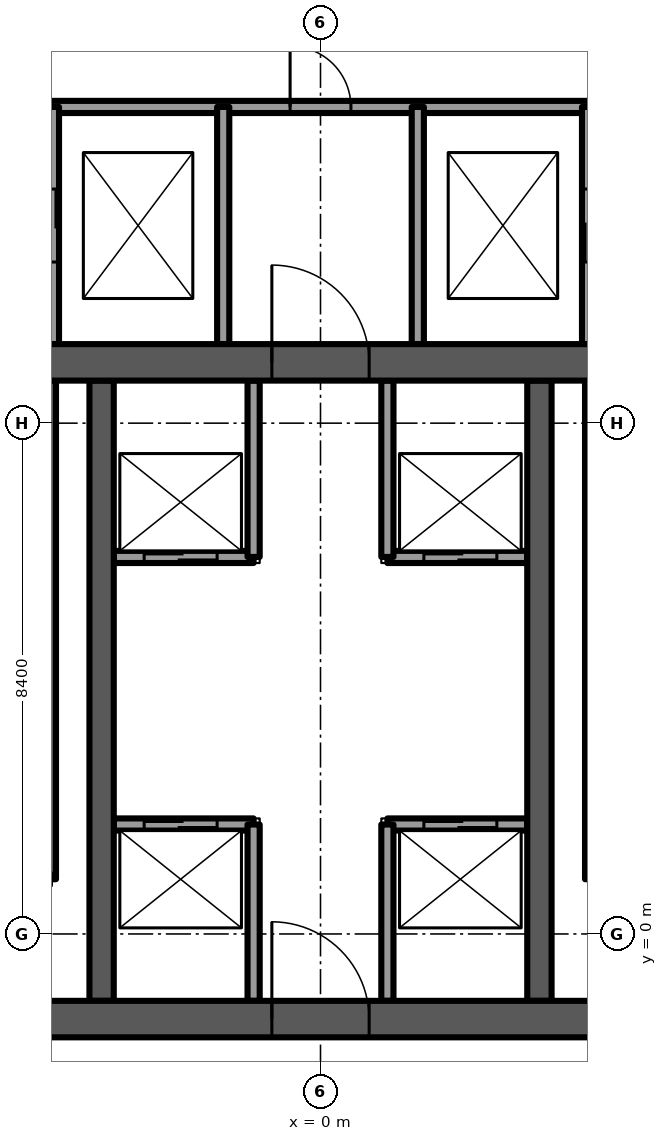
"""IFC4 building model, lengths in metres.
Left out: names, types, materials, properties, quantities, classifications, styles, units other than length and angle.
Written with IfcOpenShell. Run it as: python <this file> out.ifc"""

import sys

from ifc_helpers import new_model, si_unit, direction, frame, frame_2d, origin, place, context, subcontext, project, spatial, rectangle, extrude, element, fill, save


model = new_model("IFC4")
c1 = context("Model", 3, precision=1e-05, world=origin(), true_north=direction((0.0, 1.0)))
c2 = subcontext(c1, "Body", "Model", "MODEL_VIEW")
j1 = project(units=[si_unit("LENGTHUNIT", "METRE"), si_unit("PLANEANGLEUNIT", "RADIAN")], contexts=[c1])
p1 = place(None, origin())
s1 = spatial("IfcSite", under=j1, at=p1, CompositionType="ELEMENT")
p2 = place(p1, origin())
s2 = spatial("IfcBuilding", under=s1, at=p2, CompositionType="ELEMENT")
p3 = place(p2, frame((0.0, 0.0, 229.5)))
s3 = spatial("IfcBuildingStorey", under=s2, at=p3, CompositionType="ELEMENT", Elevation=229.5)
p4 = place(p3, frame((-8.5, -1.4, -0.3), z_axis=(0.0, 0.0, 1.0), x_axis=(1.0, 0.0, 0.0)))
e1 = element("IfcWall", 1, at=p4, inside=s3, PredefinedType="SHEAR", context=c2, shape_type="SweptSolid", body=[
    extrude(rectangle(XDim=17.0, YDim=0.6, at=frame_2d((8.5, 0.0))), origin(), (0.0, 0.0, 1.0), 3.75),
])
p5 = place(p4, frame((7.7, 0.0, 0.0)))
e2 = element("IfcOpeningElement", 2, at=p5, cuts=e1, PredefinedType="OPENING", context=c2, shape_type="SweptSolid", body=[
    extrude(rectangle(XDim=1.6, YDim=2.1, at=frame_2d((0.8, 1.05))), frame((0.0, 0.3, 0.0), z_axis=(0.0, -1.0, 0.0), x_axis=(1.0, 0.0, 0.0)), (0.0, 0.0, 1.0), 0.6),
])
p6 = place(p3, frame((-8.5, 9.4, -0.3), z_axis=(0.0, 0.0, 1.0), x_axis=(1.0, 0.0, 0.0)))
e3 = element("IfcWall", 3, at=p6, inside=s3, PredefinedType="SHEAR", context=c2, shape_type="SweptSolid", body=[
    extrude(rectangle(XDim=17.0, YDim=0.6, at=frame_2d((8.5, 0.0))), origin(), (0.0, 0.0, 1.0), 3.75),
])
p7 = place(p6, frame((7.7, 0.0, 0.0)))
e4 = element("IfcOpeningElement", 4, at=p7, cuts=e3, PredefinedType="OPENING", context=c2, shape_type="SweptSolid", body=[
    extrude(rectangle(XDim=1.6, YDim=2.1, at=frame_2d((0.8, 1.05))), frame((0.0, 0.3, 0.0), z_axis=(0.0, -1.0, 0.0), x_axis=(1.0, 0.0, 0.0)), (0.0, 0.0, 1.0), 0.6),
])
p8 = place(p6, frame((1.75, 0.0, 0.0)))
e5 = element("IfcOpeningElement", 5, at=p8, cuts=e3, PredefinedType="OPENING", context=c2, shape_type="SweptSolid", body=[
    extrude(rectangle(XDim=1.1, YDim=2.1, at=frame_2d((0.55, 1.05))), frame((0.0, 0.3, 0.0), z_axis=(0.0, -1.0, 0.0), x_axis=(1.0, 0.0, 0.0)), (0.0, 0.0, 1.0), 0.6),
])
p9 = place(p6, frame((14.15, 0.0, 0.0)))
e6 = element("IfcOpeningElement", 6, at=p9, cuts=e3, PredefinedType="OPENING", context=c2, shape_type="SweptSolid", body=[
    extrude(rectangle(XDim=1.1, YDim=2.1, at=frame_2d((0.55, 1.05))), frame((0.0, 0.3, 0.0), z_axis=(0.0, -1.0, 0.0), x_axis=(1.0, 0.0, 0.0)), (0.0, 0.0, 1.0), 0.6),
])
for number, where, z_axis, x_axis in (
    (7, (-3.6, -1.1, -0.3), (0.0, 0.0, 1.0), (0.0, 1.0, 0.0)),
    (8, (3.6, -1.1, -0.3), (0.0, 0.0, 1.0), (0.0, 1.0, 0.0)),
):
    element("IfcWall", number, at=place(p3, frame(where, z_axis=z_axis, x_axis=x_axis)), inside=s3, PredefinedType="SHEAR", context=c2, shape_type="SweptSolid", body=[
        extrude(rectangle(XDim=10.2, YDim=0.4, at=frame_2d((5.1, 0.0))), origin(), (0.0, 0.0, 1.0), 3.75),
    ])
p10 = place(p3, frame((-3.4, 1.8, 0.0), z_axis=(0.0, 0.0, 1.0), x_axis=(1.0, 0.0, 0.0)))
e9 = element("IfcWall", 9, at=p10, inside=s3, PredefinedType="PARTITIONING", context=c2, shape_type="SweptSolid", body=[
    extrude(rectangle(XDim=2.3, YDim=0.2, at=frame_2d((1.15, 0.0))), origin(), (0.0, 0.0, 1.0), 3.45),
])
p11 = place(p10, frame((0.5, 0.0, 0.0)))
e10 = element("IfcOpeningElement", 10, at=p11, cuts=e9, PredefinedType="OPENING", context=c2, shape_type="SweptSolid", body=[
    extrude(rectangle(XDim=1.2, YDim=2.1, at=frame_2d((0.6, 1.05))), frame((0.0, 0.1, 0.0), z_axis=(0.0, -1.0, 0.0), x_axis=(1.0, 0.0, 0.0)), (0.0, 0.0, 1.0), 0.2),
])
p12 = place(p3, frame((-3.4, 6.2, 0.0), z_axis=(0.0, 0.0, 1.0), x_axis=(1.0, 0.0, 0.0)))
e11 = element("IfcWall", 11, at=p12, inside=s3, PredefinedType="PARTITIONING", context=c2, shape_type="SweptSolid", body=[
    extrude(rectangle(XDim=2.3, YDim=0.2, at=frame_2d((1.15, 0.0))), origin(), (0.0, 0.0, 1.0), 3.45),
])
p13 = place(p12, frame((0.5, 0.0, 0.0)))
e12 = element("IfcOpeningElement", 12, at=p13, cuts=e11, PredefinedType="OPENING", context=c2, shape_type="SweptSolid", body=[
    extrude(rectangle(XDim=1.2, YDim=2.1, at=frame_2d((0.6, 1.05))), frame((0.0, 0.1, 0.0), z_axis=(0.0, -1.0, 0.0), x_axis=(1.0, 0.0, 0.0)), (0.0, 0.0, 1.0), 0.2),
])
p14 = place(p3, frame((1.1, 1.8, 0.0), z_axis=(0.0, 0.0, 1.0), x_axis=(1.0, 0.0, 0.0)))
e13 = element("IfcWall", 13, at=p14, inside=s3, PredefinedType="PARTITIONING", context=c2, shape_type="SweptSolid", body=[
    extrude(rectangle(XDim=2.3, YDim=0.2, at=frame_2d((1.15, 0.0))), origin(), (0.0, 0.0, 1.0), 3.45),
])
p15 = place(p14, frame((0.6, 0.0, 0.0)))
e14 = element("IfcOpeningElement", 14, at=p15, cuts=e13, PredefinedType="OPENING", context=c2, shape_type="SweptSolid", body=[
    extrude(rectangle(XDim=1.2, YDim=2.1, at=frame_2d((0.6, 1.05))), frame((0.0, 0.1, 0.0), z_axis=(0.0, -1.0, 0.0), x_axis=(1.0, 0.0, 0.0)), (0.0, 0.0, 1.0), 0.2),
])
p16 = place(p3, frame((1.1, 6.2, 0.0), z_axis=(0.0, 0.0, 1.0), x_axis=(1.0, 0.0, 0.0)))
e15 = element("IfcWall", 15, at=p16, inside=s3, PredefinedType="PARTITIONING", context=c2, shape_type="SweptSolid", body=[
    extrude(rectangle(XDim=2.3, YDim=0.2, at=frame_2d((1.15, 0.0))), origin(), (0.0, 0.0, 1.0), 3.45),
])
p17 = place(p16, frame((0.6, 0.0, 0.0)))
e16 = element("IfcOpeningElement", 16, at=p17, cuts=e15, PredefinedType="OPENING", context=c2, shape_type="SweptSolid", body=[
    extrude(rectangle(XDim=1.2, YDim=2.1, at=frame_2d((0.6, 1.05))), frame((0.0, 0.1, 0.0), z_axis=(0.0, -1.0, 0.0), x_axis=(1.0, 0.0, 0.0)), (0.0, 0.0, 1.0), 0.2),
])
for number, where, z_axis, x_axis in (
    (17, (-1.1, -1.1, 0.0), (0.0, 0.0, 1.0), (0.0, 1.0, 0.0)),
    (18, (1.1, -1.1, 0.0), (0.0, 0.0, 1.0), (0.0, 1.0, 0.0)),
    (19, (-1.1, 6.2, 0.0), (0.0, 0.0, 1.0), (0.0, 1.0, 0.0)),
    (20, (1.1, 6.2, 0.0), (0.0, 0.0, 1.0), (0.0, 1.0, 0.0)),
):
    element("IfcWall", number, at=place(p3, frame(where, z_axis=z_axis, x_axis=x_axis)), inside=s3, PredefinedType="PARTITIONING", context=c2, shape_type="SweptSolid", body=[
        extrude(rectangle(XDim=2.9, YDim=0.2, at=frame_2d((1.45, 0.0))), origin(), (0.0, 0.0, 1.0), 3.45),
    ])
for number, where, z_axis, x_axis in (
    (21, (-4.45, 0.9, -0.3), (0.0, 0.0, 1.0), (0.0, 1.0, 0.0)),
    (22, (4.45, 0.9, -0.3), (0.0, 0.0, 1.0), (0.0, 1.0, 0.0)),
):
    element("IfcWall", number, at=place(p3, frame(where, z_axis=z_axis, x_axis=x_axis)), inside=s3, PredefinedType="SOLIDWALL", context=c2, shape_type="SweptSolid", body=[
        extrude(rectangle(XDim=8.2, YDim=0.2, at=frame_2d((4.1, 0.0))), origin(), (0.0, 0.0, 1.0), 3.75),
    ])
p18 = place(p3, frame((-8.5, 13.6, 0.0), z_axis=(0.0, 0.0, 1.0), x_axis=(1.0, 0.0, 0.0)))
e23 = element("IfcWall", 23, at=p18, inside=s3, PredefinedType="PARTITIONING", context=c2, shape_type="SweptSolid", body=[
    extrude(rectangle(XDim=17.0, YDim=0.2, at=frame_2d((8.5, 0.0))), origin(), (0.0, 0.0, 1.0), 3.45),
])
p19 = place(p18, frame((8.0, 0.0, 0.0)))
e24 = element("IfcOpeningElement", 24, at=p19, cuts=e23, PredefinedType="OPENING", context=c2, shape_type="SweptSolid", body=[
    extrude(rectangle(XDim=1.0, YDim=2.1, at=frame_2d((0.5, 1.05))), frame((0.0, 0.1, 0.0), z_axis=(0.0, -1.0, 0.0), x_axis=(1.0, 0.0, 0.0)), (0.0, 0.0, 1.0), 0.2),
])
p20 = place(p3, frame((-4.4, 9.7, 0.0), z_axis=(0.0, 0.0, 1.0), x_axis=(0.0, 1.0, 0.0)))
e25 = element("IfcWall", 25, at=p20, inside=s3, PredefinedType="PARTITIONING", context=c2, shape_type="SweptSolid", body=[
    extrude(rectangle(XDim=3.9, YDim=0.2, at=frame_2d((1.95, 0.0))), origin(), (0.0, 0.0, 1.0), 3.45),
])
p21 = place(p20, frame((1.35, 0.0, 0.0)))
e26 = element("IfcOpeningElement", 26, at=p21, cuts=e25, PredefinedType="OPENING", context=c2, shape_type="SweptSolid", body=[
    extrude(rectangle(XDim=1.2, YDim=2.1, at=frame_2d((0.6, 1.05))), frame((0.0, 0.1, 0.0), z_axis=(0.0, -1.0, 0.0), x_axis=(1.0, 0.0, 0.0)), (0.0, 0.0, 1.0), 0.2),
])
p22 = place(p3, frame((4.4, 9.7, 0.0), z_axis=(0.0, 0.0, 1.0), x_axis=(0.0, 1.0, 0.0)))
e27 = element("IfcWall", 27, at=p22, inside=s3, PredefinedType="PARTITIONING", context=c2, shape_type="SweptSolid", body=[
    extrude(rectangle(XDim=3.9, YDim=0.2, at=frame_2d((1.95, 0.0))), origin(), (0.0, 0.0, 1.0), 3.45),
])
p23 = place(p22, frame((1.35, 0.0, 0.0)))
e28 = element("IfcOpeningElement", 28, at=p23, cuts=e27, PredefinedType="OPENING", context=c2, shape_type="SweptSolid", body=[
    extrude(rectangle(XDim=1.2, YDim=2.1, at=frame_2d((0.6, 1.05))), frame((0.0, 0.1, 0.0), z_axis=(0.0, -1.0, 0.0), x_axis=(1.0, 0.0, 0.0)), (0.0, 0.0, 1.0), 0.2),
])
for number, where, z_axis, x_axis in (
    (29, (-1.6, 9.7, 0.0), (0.0, 0.0, 1.0), (0.0, 1.0, 0.0)),
    (30, (1.6, 9.7, 0.0), (0.0, 0.0, 1.0), (0.0, 1.0, 0.0)),
):
    element("IfcWall", number, at=place(p3, frame(where, z_axis=z_axis, x_axis=x_axis)), inside=s3, PredefinedType="PARTITIONING", context=c2, shape_type="SweptSolid", body=[
        extrude(rectangle(XDim=3.9, YDim=0.2, at=frame_2d((1.95, 0.0))), origin(), (0.0, 0.0, 1.0), 3.45),
    ])
p24 = place(p11, origin())
e31 = element("IfcDoor", 31, at=p24, inside=s3, OperationType="SLIDING_TO_LEFT", PredefinedType="DOOR", context=c2, shape_type="SweptSolid", body=[
    extrude(rectangle(XDim=1.2, YDim=2.1, at=frame_2d((0.6, 1.05))), frame((0.0, 0.025, 0.0), z_axis=(0.0, -1.0, 0.0), x_axis=(1.0, 0.0, 0.0)), (0.0, 0.0, 1.0), 0.05),
])
fill(e10, e31)
p25 = place(p15, origin())
e32 = element("IfcDoor", 32, at=p25, inside=s3, OperationType="SLIDING_TO_LEFT", PredefinedType="DOOR", context=c2, shape_type="SweptSolid", body=[
    extrude(rectangle(XDim=1.2, YDim=2.1, at=frame_2d((0.6, 1.05))), frame((0.0, 0.025, 0.0), z_axis=(0.0, -1.0, 0.0), x_axis=(1.0, 0.0, 0.0)), (0.0, 0.0, 1.0), 0.05),
])
fill(e14, e32)
p26 = place(p13, origin())
e33 = element("IfcDoor", 33, at=p26, inside=s3, OperationType="SLIDING_TO_LEFT", PredefinedType="DOOR", context=c2, shape_type="SweptSolid", body=[
    extrude(rectangle(XDim=1.2, YDim=2.1, at=frame_2d((0.6, 1.05))), frame((0.0, 0.025, 0.0), z_axis=(0.0, -1.0, 0.0), x_axis=(1.0, 0.0, 0.0)), (0.0, 0.0, 1.0), 0.05),
])
fill(e12, e33)
p27 = place(p17, origin())
e34 = element("IfcDoor", 34, at=p27, inside=s3, OperationType="SLIDING_TO_LEFT", PredefinedType="DOOR", context=c2, shape_type="SweptSolid", body=[
    extrude(rectangle(XDim=1.2, YDim=2.1, at=frame_2d((0.6, 1.05))), frame((0.0, 0.025, 0.0), z_axis=(0.0, -1.0, 0.0), x_axis=(1.0, 0.0, 0.0)), (0.0, 0.0, 1.0), 0.05),
])
fill(e16, e34)
p28 = place(p5, origin())
e35 = element("IfcDoor", 35, at=p28, inside=s3, OperationType="DOUBLE_DOOR_SINGLE_SWING", PredefinedType="DOOR", context=c2, shape_type="SweptSolid", body=[
    extrude(rectangle(XDim=1.6, YDim=2.1, at=frame_2d((0.8, 1.05))), frame((0.0, 0.025, 0.0), z_axis=(0.0, -1.0, 0.0), x_axis=(1.0, 0.0, 0.0)), (0.0, 0.0, 1.0), 0.05),
])
fill(e2, e35)
p29 = place(p7, origin())
e36 = element("IfcDoor", 36, at=p29, inside=s3, OperationType="DOUBLE_DOOR_SINGLE_SWING", PredefinedType="DOOR", context=c2, shape_type="SweptSolid", body=[
    extrude(rectangle(XDim=1.6, YDim=2.1, at=frame_2d((0.8, 1.05))), frame((0.0, 0.025, 0.0), z_axis=(0.0, -1.0, 0.0), x_axis=(1.0, 0.0, 0.0)), (0.0, 0.0, 1.0), 0.05),
])
fill(e4, e36)
p30 = place(p21, origin())
e37 = element("IfcDoor", 37, at=p30, inside=s3, OperationType="SLIDING_TO_LEFT", PredefinedType="DOOR", context=c2, shape_type="SweptSolid", body=[
    extrude(rectangle(XDim=1.2, YDim=2.1, at=frame_2d((0.6, 1.05))), frame((0.0, 0.025, 0.0), z_axis=(0.0, -1.0, 0.0), x_axis=(1.0, 0.0, 0.0)), (0.0, 0.0, 1.0), 0.05),
])
fill(e26, e37)
p31 = place(p23, origin())
e38 = element("IfcDoor", 38, at=p31, inside=s3, OperationType="SLIDING_TO_LEFT", PredefinedType="DOOR", context=c2, shape_type="SweptSolid", body=[
    extrude(rectangle(XDim=1.2, YDim=2.1, at=frame_2d((0.6, 1.05))), frame((0.0, 0.025, 0.0), z_axis=(0.0, -1.0, 0.0), x_axis=(1.0, 0.0, 0.0)), (0.0, 0.0, 1.0), 0.05),
])
fill(e28, e38)
p32 = place(p19, origin())
e39 = element("IfcDoor", 39, at=p32, inside=s3, OperationType="SINGLE_SWING_LEFT", PredefinedType="DOOR", context=c2, shape_type="SweptSolid", body=[
    extrude(rectangle(XDim=1.0, YDim=2.1, at=frame_2d((0.5, 1.05))), frame((0.0, 0.025, 0.0), z_axis=(0.0, -1.0, 0.0), x_axis=(1.0, 0.0, 0.0)), (0.0, 0.0, 1.0), 0.05),
])
fill(e24, e39)
save(model, sys.argv[1])
